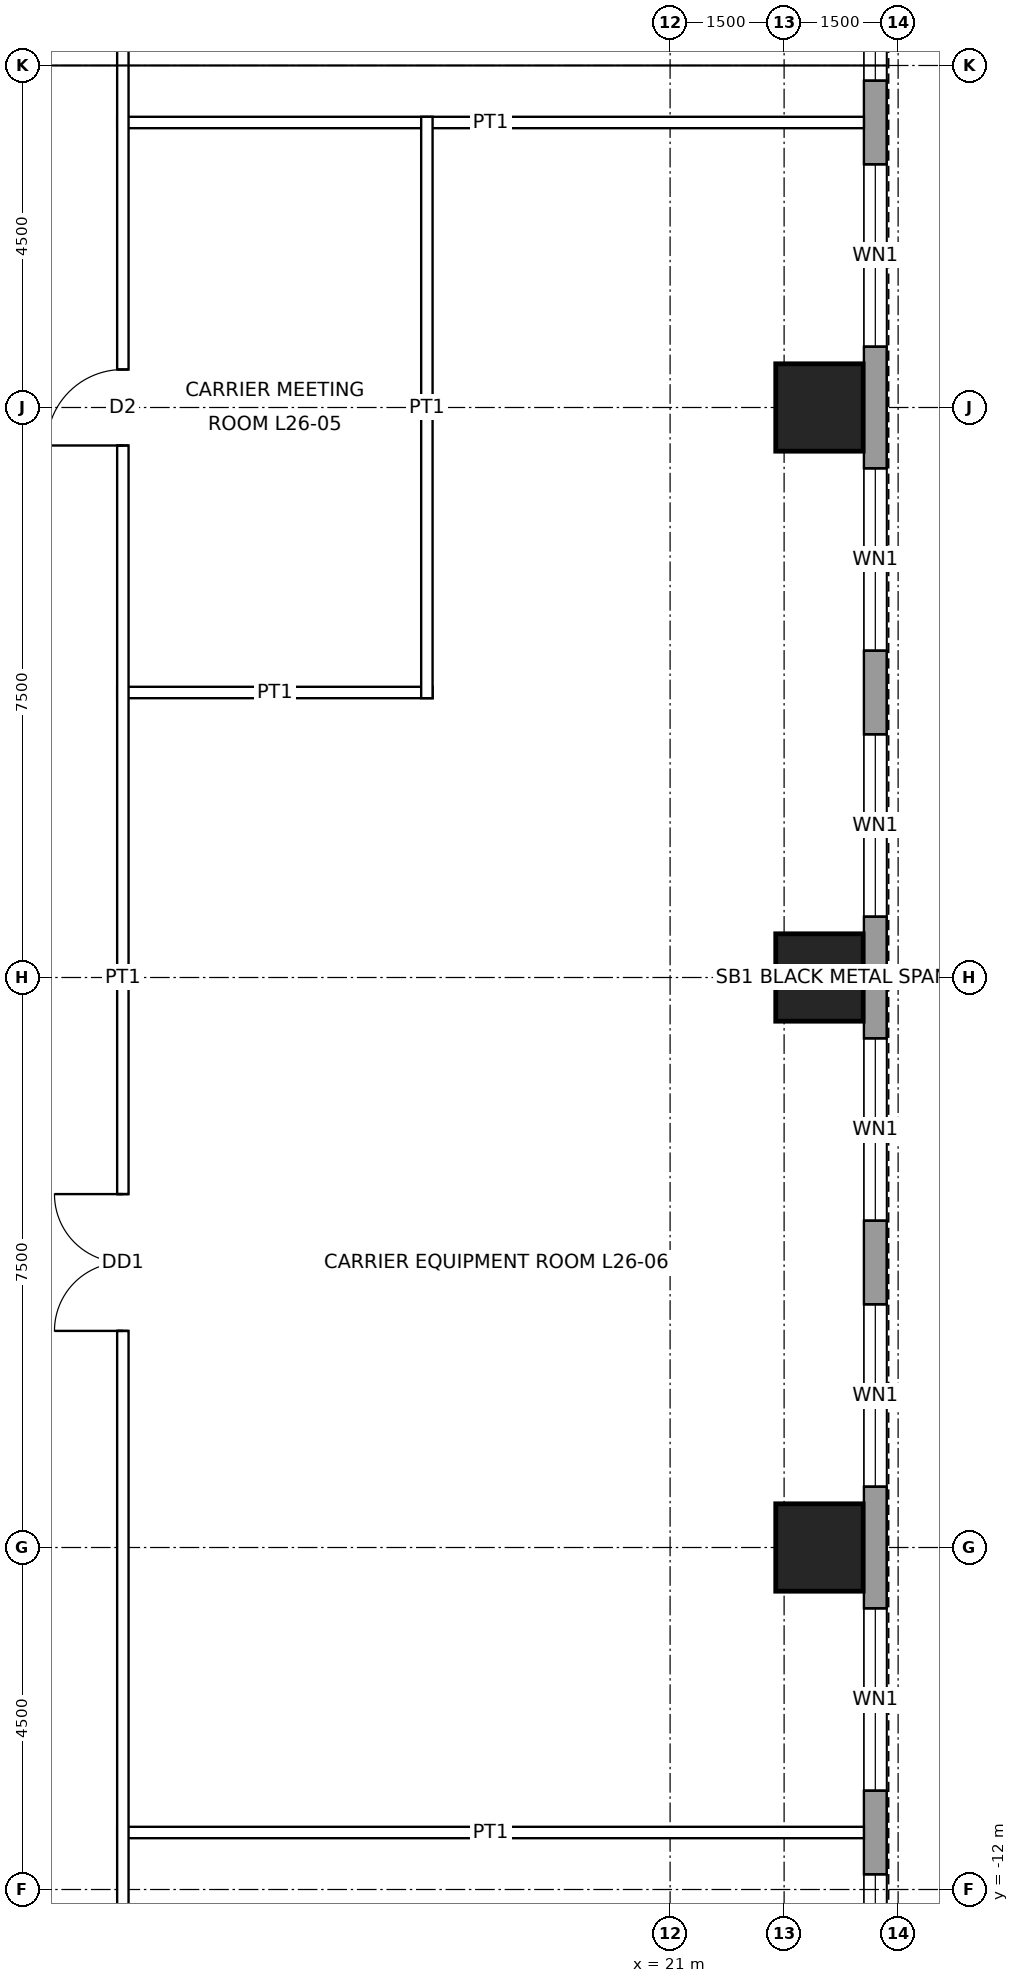
"""IFC4 building model, lengths in metres.
Left out: names, types, materials, properties, quantities, classifications, styles, units other than length and angle.
Written with IfcOpenShell. Run it as: python <this file> out.ifc"""

import sys

from ifc_helpers import new_model, si_unit, direction, frame, frame_2d, origin, origin_2d, place, context, subcontext, project, spatial, rectangle, hollow_rectangle, extrude, element, fill, save


model = new_model("IFC4")
c1 = context("Model", 3, precision=1e-05, world=origin(), true_north=direction((0.0, 1.0)))
c2 = subcontext(c1, "Body", "Model", "MODEL_VIEW")
j1 = project(units=[si_unit("LENGTHUNIT", "METRE"), si_unit("PLANEANGLEUNIT", "RADIAN")], contexts=[c1])
p1 = place(None, origin())
s1 = spatial("IfcSite", under=j1, at=p1, CompositionType="ELEMENT")
p2 = place(p1, origin())
s2 = spatial("IfcBuilding", under=s1, at=p2, CompositionType="ELEMENT")
p3 = place(p2, frame((0.0, 0.0, 131.4)))
s3 = spatial("IfcBuildingStorey", under=s2, at=p3, CompositionType="ELEMENT", Elevation=131.4)
for number, where, z_axis, x_axis in (
    (1, (22.965, 7.5, 0.0), (0.0, 0.0, 1.0), (1.0, 0.0, 0.0)),
    (2, (22.965, 0.0, 0.0), (0.0, 0.0, 1.0), (1.0, 0.0, 0.0)),
    (3, (22.965, -7.5, 0.0), (0.0, 0.0, 1.0), (1.0, 0.0, 0.0)),
):
    element("IfcColumn", number, at=place(p3, frame(where, z_axis=z_axis, x_axis=x_axis)), inside=s3, PredefinedType="COLUMN", context=c2, shape_type="SweptSolid", body=[
        extrude(hollow_rectangle(XDim=1.15, YDim=1.15, WallThickness=0.075, at=origin_2d()), origin(), (0.0, 0.0, 1.0), 4.5),
    ])
p4 = place(p3, frame((23.7, 16.2, 0.0), z_axis=(0.0, 0.0, 1.0), x_axis=(0.0, -1.0, 0.0)))
e4 = element("IfcWall", 4, at=p4, inside=s3, PredefinedType="SOLIDWALL", context=c2, shape_type="SweptSolid", body=[
    extrude(rectangle(XDim=32.4, YDim=0.3, at=frame_2d((16.2, 0.0))), origin(), (0.0, 0.0, 1.0), 4.3),
])
p5 = place(p4, frame((2.0, 0.0, 1.0)))
e5 = element("IfcOpeningElement", 5, at=p5, cuts=e4, PredefinedType="OPENING", context=c2, shape_type="SweptSolid", body=[
    extrude(rectangle(XDim=2.4, YDim=1.2, at=frame_2d((1.2, 0.6))), frame((0.0, 0.16, 0.0), z_axis=(0.0, -1.0, 0.0), x_axis=(1.0, 0.0, 0.0)), (0.0, 0.0, 1.0), 0.32),
])
p6 = place(p4, frame((5.5, 0.0, 1.0)))
e6 = element("IfcOpeningElement", 6, at=p6, cuts=e4, PredefinedType="OPENING", context=c2, shape_type="SweptSolid", body=[
    extrude(rectangle(XDim=2.4, YDim=1.2, at=frame_2d((1.2, 0.6))), frame((0.0, 0.16, 0.0), z_axis=(0.0, -1.0, 0.0), x_axis=(1.0, 0.0, 0.0)), (0.0, 0.0, 1.0), 0.32),
])
p7 = place(p4, frame((9.5, 0.0, 1.0)))
e7 = element("IfcOpeningElement", 7, at=p7, cuts=e4, PredefinedType="OPENING", context=c2, shape_type="SweptSolid", body=[
    extrude(rectangle(XDim=2.4, YDim=1.2, at=frame_2d((1.2, 0.6))), frame((0.0, 0.16, 0.0), z_axis=(0.0, -1.0, 0.0), x_axis=(1.0, 0.0, 0.0)), (0.0, 0.0, 1.0), 0.32),
])
p8 = place(p4, frame((13.0, 0.0, 1.0)))
e8 = element("IfcOpeningElement", 8, at=p8, cuts=e4, PredefinedType="OPENING", context=c2, shape_type="SweptSolid", body=[
    extrude(rectangle(XDim=2.4, YDim=1.2, at=frame_2d((1.2, 0.6))), frame((0.0, 0.16, 0.0), z_axis=(0.0, -1.0, 0.0), x_axis=(1.0, 0.0, 0.0)), (0.0, 0.0, 1.0), 0.32),
])
p9 = place(p4, frame((17.0, 0.0, 1.0)))
e9 = element("IfcOpeningElement", 9, at=p9, cuts=e4, PredefinedType="OPENING", context=c2, shape_type="SweptSolid", body=[
    extrude(rectangle(XDim=2.4, YDim=1.2, at=frame_2d((1.2, 0.6))), frame((0.0, 0.16, 0.0), z_axis=(0.0, -1.0, 0.0), x_axis=(1.0, 0.0, 0.0)), (0.0, 0.0, 1.0), 0.32),
])
p10 = place(p4, frame((20.5, 0.0, 1.0)))
e10 = element("IfcOpeningElement", 10, at=p10, cuts=e4, PredefinedType="OPENING", context=c2, shape_type="SweptSolid", body=[
    extrude(rectangle(XDim=2.4, YDim=1.2, at=frame_2d((1.2, 0.6))), frame((0.0, 0.16, 0.0), z_axis=(0.0, -1.0, 0.0), x_axis=(1.0, 0.0, 0.0)), (0.0, 0.0, 1.0), 0.32),
])
p11 = place(p4, frame((24.5, 0.0, 1.0)))
e11 = element("IfcOpeningElement", 11, at=p11, cuts=e4, PredefinedType="OPENING", context=c2, shape_type="SweptSolid", body=[
    extrude(rectangle(XDim=2.4, YDim=1.2, at=frame_2d((1.2, 0.6))), frame((0.0, 0.16, 0.0), z_axis=(0.0, -1.0, 0.0), x_axis=(1.0, 0.0, 0.0)), (0.0, 0.0, 1.0), 0.32),
])
p12 = place(p4, frame((28.0, 0.0, 1.0)))
e12 = element("IfcOpeningElement", 12, at=p12, cuts=e4, PredefinedType="OPENING", context=c2, shape_type="SweptSolid", body=[
    extrude(rectangle(XDim=2.4, YDim=1.2, at=frame_2d((1.2, 0.6))), frame((0.0, 0.16, 0.0), z_axis=(0.0, -1.0, 0.0), x_axis=(1.0, 0.0, 0.0)), (0.0, 0.0, 1.0), 0.32),
])
p13 = place(p3, frame((13.725, -11.25, 0.0), z_axis=(0.0, 0.0, 1.0), x_axis=(1.0, 0.0, 0.0)))
e13 = element("IfcWall", 13, at=p13, inside=s3, PredefinedType="PARTITIONING", context=c2, shape_type="SweptSolid", body=[
    extrude(rectangle(XDim=9.825, YDim=0.15, at=frame_2d((4.913, 0.0))), origin(), (0.0, 0.0, 1.0), 3.431),
])
p14 = place(p3, frame((13.725, 3.75, 0.0), z_axis=(0.0, 0.0, 1.0), x_axis=(1.0, 0.0, 0.0)))
e14 = element("IfcWall", 14, at=p14, inside=s3, PredefinedType="PARTITIONING", context=c2, shape_type="SweptSolid", body=[
    extrude(rectangle(XDim=4.15, YDim=0.15, at=frame_2d((2.075, 0.0))), origin(), (0.0, 0.0, 1.0), 3.431),
])
p15 = place(p3, frame((13.725, 11.25, 0.0), z_axis=(0.0, 0.0, 1.0), x_axis=(1.0, 0.0, 0.0)))
e15 = element("IfcWall", 15, at=p15, inside=s3, PredefinedType="PARTITIONING", context=c2, shape_type="SweptSolid", body=[
    extrude(rectangle(XDim=9.825, YDim=0.15, at=frame_2d((4.913, 0.0))), origin(), (0.0, 0.0, 1.0), 3.431),
])
p16 = place(p3, frame((13.8, -13.875, 0.0), z_axis=(0.0, 0.0, 1.0), x_axis=(0.0, 1.0, 0.0)))
e16 = element("IfcWall", 16, at=p16, inside=s3, PredefinedType="PARTITIONING", context=c2, shape_type="SweptSolid", body=[
    extrude(rectangle(XDim=27.75, YDim=0.15, at=frame_2d((13.875, 0.0))), origin(), (0.0, 0.0, 1.0), 4.3),
])
p17 = place(p16, frame((20.875, 0.0, 0.0)))
e17 = element("IfcOpeningElement", 17, at=p17, cuts=e16, PredefinedType="OPENING", context=c2, shape_type="SweptSolid", body=[
    extrude(rectangle(XDim=1.0, YDim=2.1, at=frame_2d((0.5, 1.05))), frame((0.0, 0.085, 0.0), z_axis=(0.0, -1.0, 0.0), x_axis=(1.0, 0.0, 0.0)), (0.0, 0.0, 1.0), 0.17),
])
p18 = place(p16, frame((9.225, 0.0, 0.0)))
e18 = element("IfcOpeningElement", 18, at=p18, cuts=e16, PredefinedType="OPENING", context=c2, shape_type="SweptSolid", body=[
    extrude(rectangle(XDim=1.8, YDim=2.4, at=frame_2d((0.9, 1.2))), frame((0.0, 0.085, 0.0), z_axis=(0.0, -1.0, 0.0), x_axis=(1.0, 0.0, 0.0)), (0.0, 0.0, 1.0), 0.17),
])
p19 = place(p3, frame((17.8, 3.675, 0.0), z_axis=(0.0, 0.0, 1.0), x_axis=(0.0, 1.0, 0.0)))
e19 = element("IfcWall", 19, at=p19, inside=s3, PredefinedType="PARTITIONING", context=c2, shape_type="SweptSolid", body=[
    extrude(rectangle(XDim=7.65, YDim=0.15, at=frame_2d((3.825, 0.0))), origin(), (0.0, 0.0, 1.0), 4.3),
])
p20 = place(p5, origin())
e20 = element("IfcWindow", 20, at=p20, inside=s3, PartitioningType="SINGLE_PANEL", PredefinedType="WINDOW", context=c2, shape_type="SweptSolid", body=[
    extrude(rectangle(XDim=2.4, YDim=1.2, at=frame_2d((1.2, 0.6))), frame((0.0, 0.03, 0.0), z_axis=(0.0, -1.0, 0.0), x_axis=(1.0, 0.0, 0.0)), (0.0, 0.0, 1.0), 0.06),
])
fill(e5, e20)
p21 = place(p6, origin())
e21 = element("IfcWindow", 21, at=p21, inside=s3, PartitioningType="SINGLE_PANEL", PredefinedType="WINDOW", context=c2, shape_type="SweptSolid", body=[
    extrude(rectangle(XDim=2.4, YDim=1.2, at=frame_2d((1.2, 0.6))), frame((0.0, 0.03, 0.0), z_axis=(0.0, -1.0, 0.0), x_axis=(1.0, 0.0, 0.0)), (0.0, 0.0, 1.0), 0.06),
])
fill(e6, e21)
p22 = place(p7, origin())
e22 = element("IfcWindow", 22, at=p22, inside=s3, PartitioningType="SINGLE_PANEL", PredefinedType="WINDOW", context=c2, shape_type="SweptSolid", body=[
    extrude(rectangle(XDim=2.4, YDim=1.2, at=frame_2d((1.2, 0.6))), frame((0.0, 0.03, 0.0), z_axis=(0.0, -1.0, 0.0), x_axis=(1.0, 0.0, 0.0)), (0.0, 0.0, 1.0), 0.06),
])
fill(e7, e22)
p23 = place(p8, origin())
e23 = element("IfcWindow", 23, at=p23, inside=s3, PartitioningType="SINGLE_PANEL", PredefinedType="WINDOW", context=c2, shape_type="SweptSolid", body=[
    extrude(rectangle(XDim=2.4, YDim=1.2, at=frame_2d((1.2, 0.6))), frame((0.0, 0.03, 0.0), z_axis=(0.0, -1.0, 0.0), x_axis=(1.0, 0.0, 0.0)), (0.0, 0.0, 1.0), 0.06),
])
fill(e8, e23)
p24 = place(p9, origin())
e24 = element("IfcWindow", 24, at=p24, inside=s3, PartitioningType="SINGLE_PANEL", PredefinedType="WINDOW", context=c2, shape_type="SweptSolid", body=[
    extrude(rectangle(XDim=2.4, YDim=1.2, at=frame_2d((1.2, 0.6))), frame((0.0, 0.03, 0.0), z_axis=(0.0, -1.0, 0.0), x_axis=(1.0, 0.0, 0.0)), (0.0, 0.0, 1.0), 0.06),
])
fill(e9, e24)
p25 = place(p10, origin())
e25 = element("IfcWindow", 25, at=p25, inside=s3, PartitioningType="SINGLE_PANEL", PredefinedType="WINDOW", context=c2, shape_type="SweptSolid", body=[
    extrude(rectangle(XDim=2.4, YDim=1.2, at=frame_2d((1.2, 0.6))), frame((0.0, 0.03, 0.0), z_axis=(0.0, -1.0, 0.0), x_axis=(1.0, 0.0, 0.0)), (0.0, 0.0, 1.0), 0.06),
])
fill(e10, e25)
p26 = place(p11, origin())
e26 = element("IfcWindow", 26, at=p26, inside=s3, PartitioningType="SINGLE_PANEL", PredefinedType="WINDOW", context=c2, shape_type="SweptSolid", body=[
    extrude(rectangle(XDim=2.4, YDim=1.2, at=frame_2d((1.2, 0.6))), frame((0.0, 0.03, 0.0), z_axis=(0.0, -1.0, 0.0), x_axis=(1.0, 0.0, 0.0)), (0.0, 0.0, 1.0), 0.06),
])
fill(e11, e26)
p27 = place(p12, origin())
e27 = element("IfcWindow", 27, at=p27, inside=s3, PartitioningType="SINGLE_PANEL", PredefinedType="WINDOW", context=c2, shape_type="SweptSolid", body=[
    extrude(rectangle(XDim=2.4, YDim=1.2, at=frame_2d((1.2, 0.6))), frame((0.0, 0.03, 0.0), z_axis=(0.0, -1.0, 0.0), x_axis=(1.0, 0.0, 0.0)), (0.0, 0.0, 1.0), 0.06),
])
fill(e12, e27)
p28 = place(p17, origin())
e28 = element("IfcDoor", 28, at=p28, inside=s3, OperationType="SINGLE_SWING_LEFT", PredefinedType="DOOR", context=c2, shape_type="SweptSolid", body=[
    extrude(rectangle(XDim=1.0, YDim=2.1, at=frame_2d((0.5, 1.05))), frame((0.0, 0.025, 0.0), z_axis=(0.0, -1.0, 0.0), x_axis=(1.0, 0.0, 0.0)), (0.0, 0.0, 1.0), 0.05),
])
fill(e17, e28)
p29 = place(p18, origin())
e29 = element("IfcDoor", 29, at=p29, inside=s3, OperationType="DOUBLE_DOOR_SINGLE_SWING", PredefinedType="DOOR", context=c2, shape_type="SweptSolid", body=[
    extrude(rectangle(XDim=1.8, YDim=2.4, at=frame_2d((0.9, 1.2))), frame((0.0, 0.025, 0.0), z_axis=(0.0, -1.0, 0.0), x_axis=(1.0, 0.0, 0.0)), (0.0, 0.0, 1.0), 0.05),
])
fill(e18, e29)
save(model, sys.argv[1])
